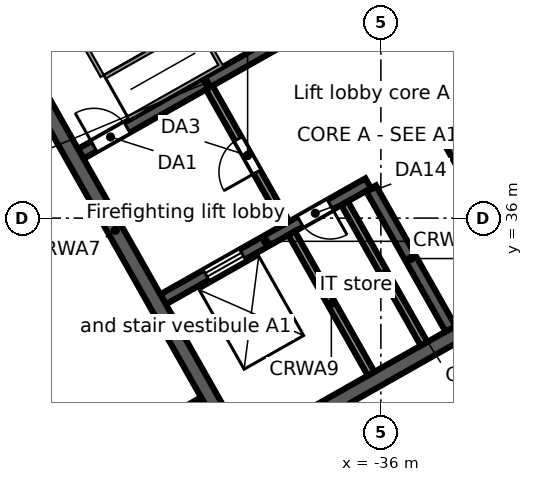
"""IFC4 building model, lengths in metres.
Left out: names, types, materials, properties, quantities, classifications, styles, units other than length and angle.
Written with IfcOpenShell. Run it as: python <this file> out.ifc"""

import sys

from ifc_helpers import new_model, si_unit, direction, frame, frame_2d, origin, place, context, subcontext, project, spatial, rectangle, extrude, element, fill, save


model = new_model("IFC4")
c1 = context("Model", 3, precision=1e-05, world=origin(), true_north=direction((0.0, 1.0)))
c2 = subcontext(c1, "Body", "Model", "MODEL_VIEW")
j1 = project(units=[si_unit("LENGTHUNIT", "METRE"), si_unit("PLANEANGLEUNIT", "RADIAN")], contexts=[c1])
p1 = place(None, origin())
s1 = spatial("IfcSite", under=j1, at=p1, CompositionType="ELEMENT")
p2 = place(p1, origin())
s2 = spatial("IfcBuilding", under=s1, at=p2, CompositionType="ELEMENT")
p3 = place(p2, frame((0.0, 0.0, 277.9)))
s3 = spatial("IfcBuildingStorey", under=s2, at=p3, CompositionType="ELEMENT", Elevation=277.9)
p4 = place(p3, frame((-58.732, 38.771, 0.0), z_axis=(0.0, 0.0, 1.0), x_axis=(0.870355615581, 0.492423702137, 0.0)))
e1 = element("IfcWall", 1, at=p4, inside=s3, PredefinedType="STANDARD", context=c2, shape_type="SweptSolid", body=[
    extrude(rectangle(XDim=64.052, YDim=0.25, at=frame_2d((32.026, 0.0))), origin(), (0.0, 0.0, 1.0), 3.52),
])
p5 = place(p4, frame((61.259, 0.0, 0.8)))
e2 = element("IfcOpeningElement", 2, at=p5, cuts=e1, PredefinedType="OPENING", context=c2, shape_type="SweptSolid", body=[
    extrude(rectangle(XDim=2.4, YDim=2.2, at=frame_2d((1.2, 1.1))), frame((0.0, 0.135, 0.0), z_axis=(0.0, -1.0, 0.0), x_axis=(1.0, 0.0, 0.0)), (0.0, 0.0, 1.0), 0.27),
])
p6 = place(p4, frame((58.216, 0.0, 0.8)))
e3 = element("IfcOpeningElement", 3, at=p6, cuts=e1, PredefinedType="OPENING", context=c2, shape_type="SweptSolid", body=[
    extrude(rectangle(XDim=2.4, YDim=2.2, at=frame_2d((1.2, 1.1))), frame((0.0, 0.135, 0.0), z_axis=(0.0, -1.0, 0.0), x_axis=(1.0, 0.0, 0.0)), (0.0, 0.0, 1.0), 0.27),
])
p7 = place(p4, frame((55.173, 0.0, 0.8)))
e4 = element("IfcOpeningElement", 4, at=p7, cuts=e1, PredefinedType="OPENING", context=c2, shape_type="SweptSolid", body=[
    extrude(rectangle(XDim=2.4, YDim=2.2, at=frame_2d((1.2, 1.1))), frame((0.0, 0.135, 0.0), z_axis=(0.0, -1.0, 0.0), x_axis=(1.0, 0.0, 0.0)), (0.0, 0.0, 1.0), 0.27),
])
p8 = place(p4, frame((52.129, 0.0, 0.8)))
e5 = element("IfcOpeningElement", 5, at=p8, cuts=e1, PredefinedType="OPENING", context=c2, shape_type="SweptSolid", body=[
    extrude(rectangle(XDim=2.4, YDim=2.2, at=frame_2d((1.2, 1.1))), frame((0.0, 0.135, 0.0), z_axis=(0.0, -1.0, 0.0), x_axis=(1.0, 0.0, 0.0)), (0.0, 0.0, 1.0), 0.27),
])
p9 = place(p4, frame((49.086, 0.0, 0.8)))
e6 = element("IfcOpeningElement", 6, at=p9, cuts=e1, PredefinedType="OPENING", context=c2, shape_type="SweptSolid", body=[
    extrude(rectangle(XDim=2.4, YDim=2.2, at=frame_2d((1.2, 1.1))), frame((0.0, 0.135, 0.0), z_axis=(0.0, -1.0, 0.0), x_axis=(1.0, 0.0, 0.0)), (0.0, 0.0, 1.0), 0.27),
])
p10 = place(p4, frame((46.043, 0.0, 0.8)))
e7 = element("IfcOpeningElement", 7, at=p10, cuts=e1, PredefinedType="OPENING", context=c2, shape_type="SweptSolid", body=[
    extrude(rectangle(XDim=2.4, YDim=2.2, at=frame_2d((1.2, 1.1))), frame((0.0, 0.135, 0.0), z_axis=(0.0, -1.0, 0.0), x_axis=(1.0, 0.0, 0.0)), (0.0, 0.0, 1.0), 0.27),
])
p11 = place(p4, frame((43.0, 0.0, 0.8)))
e8 = element("IfcOpeningElement", 8, at=p11, cuts=e1, PredefinedType="OPENING", context=c2, shape_type="SweptSolid", body=[
    extrude(rectangle(XDim=2.4, YDim=2.2, at=frame_2d((1.2, 1.1))), frame((0.0, 0.135, 0.0), z_axis=(0.0, -1.0, 0.0), x_axis=(1.0, 0.0, 0.0)), (0.0, 0.0, 1.0), 0.27),
])
p12 = place(p4, frame((39.956, 0.0, 0.8)))
e9 = element("IfcOpeningElement", 9, at=p12, cuts=e1, PredefinedType="OPENING", context=c2, shape_type="SweptSolid", body=[
    extrude(rectangle(XDim=2.4, YDim=2.2, at=frame_2d((1.2, 1.1))), frame((0.0, 0.135, 0.0), z_axis=(0.0, -1.0, 0.0), x_axis=(1.0, 0.0, 0.0)), (0.0, 0.0, 1.0), 0.27),
])
p13 = place(p4, frame((36.913, 0.0, 0.8)))
e10 = element("IfcOpeningElement", 10, at=p13, cuts=e1, PredefinedType="OPENING", context=c2, shape_type="SweptSolid", body=[
    extrude(rectangle(XDim=2.4, YDim=2.2, at=frame_2d((1.2, 1.1))), frame((0.0, 0.135, 0.0), z_axis=(0.0, -1.0, 0.0), x_axis=(1.0, 0.0, 0.0)), (0.0, 0.0, 1.0), 0.27),
])
p14 = place(p4, frame((33.87, 0.0, 0.8)))
e11 = element("IfcOpeningElement", 11, at=p14, cuts=e1, PredefinedType="OPENING", context=c2, shape_type="SweptSolid", body=[
    extrude(rectangle(XDim=2.4, YDim=2.2, at=frame_2d((1.2, 1.1))), frame((0.0, 0.135, 0.0), z_axis=(0.0, -1.0, 0.0), x_axis=(1.0, 0.0, 0.0)), (0.0, 0.0, 1.0), 0.27),
])
p15 = place(p4, frame((30.826, 0.0, 0.8)))
e12 = element("IfcOpeningElement", 12, at=p15, cuts=e1, PredefinedType="OPENING", context=c2, shape_type="SweptSolid", body=[
    extrude(rectangle(XDim=2.4, YDim=2.2, at=frame_2d((1.2, 1.1))), frame((0.0, 0.135, 0.0), z_axis=(0.0, -1.0, 0.0), x_axis=(1.0, 0.0, 0.0)), (0.0, 0.0, 1.0), 0.27),
])
p16 = place(p4, frame((27.783, 0.0, 0.8)))
e13 = element("IfcOpeningElement", 13, at=p16, cuts=e1, PredefinedType="OPENING", context=c2, shape_type="SweptSolid", body=[
    extrude(rectangle(XDim=2.4, YDim=2.2, at=frame_2d((1.2, 1.1))), frame((0.0, 0.135, 0.0), z_axis=(0.0, -1.0, 0.0), x_axis=(1.0, 0.0, 0.0)), (0.0, 0.0, 1.0), 0.27),
])
p17 = place(p4, frame((24.74, 0.0, 0.8)))
e14 = element("IfcOpeningElement", 14, at=p17, cuts=e1, PredefinedType="OPENING", context=c2, shape_type="SweptSolid", body=[
    extrude(rectangle(XDim=2.4, YDim=2.2, at=frame_2d((1.2, 1.1))), frame((0.0, 0.135, 0.0), z_axis=(0.0, -1.0, 0.0), x_axis=(1.0, 0.0, 0.0)), (0.0, 0.0, 1.0), 0.27),
])
p18 = place(p4, frame((21.696, 0.0, 0.8)))
e15 = element("IfcOpeningElement", 15, at=p18, cuts=e1, PredefinedType="OPENING", context=c2, shape_type="SweptSolid", body=[
    extrude(rectangle(XDim=2.4, YDim=2.2, at=frame_2d((1.2, 1.1))), frame((0.0, 0.135, 0.0), z_axis=(0.0, -1.0, 0.0), x_axis=(1.0, 0.0, 0.0)), (0.0, 0.0, 1.0), 0.27),
])
p19 = place(p4, frame((18.653, 0.0, 0.8)))
e16 = element("IfcOpeningElement", 16, at=p19, cuts=e1, PredefinedType="OPENING", context=c2, shape_type="SweptSolid", body=[
    extrude(rectangle(XDim=2.4, YDim=2.2, at=frame_2d((1.2, 1.1))), frame((0.0, 0.135, 0.0), z_axis=(0.0, -1.0, 0.0), x_axis=(1.0, 0.0, 0.0)), (0.0, 0.0, 1.0), 0.27),
])
p20 = place(p4, frame((15.61, 0.0, 0.8)))
e17 = element("IfcOpeningElement", 17, at=p20, cuts=e1, PredefinedType="OPENING", context=c2, shape_type="SweptSolid", body=[
    extrude(rectangle(XDim=2.4, YDim=2.2, at=frame_2d((1.2, 1.1))), frame((0.0, 0.135, 0.0), z_axis=(0.0, -1.0, 0.0), x_axis=(1.0, 0.0, 0.0)), (0.0, 0.0, 1.0), 0.27),
])
p21 = place(p4, frame((12.567, 0.0, 0.8)))
e18 = element("IfcOpeningElement", 18, at=p21, cuts=e1, PredefinedType="OPENING", context=c2, shape_type="SweptSolid", body=[
    extrude(rectangle(XDim=2.4, YDim=2.2, at=frame_2d((1.2, 1.1))), frame((0.0, 0.135, 0.0), z_axis=(0.0, -1.0, 0.0), x_axis=(1.0, 0.0, 0.0)), (0.0, 0.0, 1.0), 0.27),
])
p22 = place(p4, frame((9.523, 0.0, 0.8)))
e19 = element("IfcOpeningElement", 19, at=p22, cuts=e1, PredefinedType="OPENING", context=c2, shape_type="SweptSolid", body=[
    extrude(rectangle(XDim=2.4, YDim=2.2, at=frame_2d((1.2, 1.1))), frame((0.0, 0.135, 0.0), z_axis=(0.0, -1.0, 0.0), x_axis=(1.0, 0.0, 0.0)), (0.0, 0.0, 1.0), 0.27),
])
p23 = place(p4, frame((6.48, 0.0, 0.8)))
e20 = element("IfcOpeningElement", 20, at=p23, cuts=e1, PredefinedType="OPENING", context=c2, shape_type="SweptSolid", body=[
    extrude(rectangle(XDim=2.4, YDim=2.2, at=frame_2d((1.2, 1.1))), frame((0.0, 0.135, 0.0), z_axis=(0.0, -1.0, 0.0), x_axis=(1.0, 0.0, 0.0)), (0.0, 0.0, 1.0), 0.27),
])
p24 = place(p4, frame((3.437, 0.0, 0.8)))
e21 = element("IfcOpeningElement", 21, at=p24, cuts=e1, PredefinedType="OPENING", context=c2, shape_type="SweptSolid", body=[
    extrude(rectangle(XDim=2.4, YDim=2.2, at=frame_2d((1.2, 1.1))), frame((0.0, 0.135, 0.0), z_axis=(0.0, -1.0, 0.0), x_axis=(1.0, 0.0, 0.0)), (0.0, 0.0, 1.0), 0.27),
])
p25 = place(p4, frame((0.393, 0.0, 0.8)))
e22 = element("IfcOpeningElement", 22, at=p25, cuts=e1, PredefinedType="OPENING", context=c2, shape_type="SweptSolid", body=[
    extrude(rectangle(XDim=2.4, YDim=2.2, at=frame_2d((1.2, 1.1))), frame((0.0, 0.135, 0.0), z_axis=(0.0, -1.0, 0.0), x_axis=(1.0, 0.0, 0.0)), (0.0, 0.0, 1.0), 0.27),
])
p26 = place(p3, frame((-44.115, 26.507, 0.0), z_axis=(0.0, 0.0, 1.0), x_axis=(-0.857166583633, 0.515039268311, 0.0)))
e23 = element("IfcWall", 23, at=p26, inside=s3, PredefinedType="STANDARD", context=c2, shape_type="SweptSolid", body=[
    extrude(rectangle(XDim=17.106, YDim=0.25, at=frame_2d((8.553, 0.0))), origin(), (0.0, 0.0, 1.0), 3.52),
])
p27 = place(p26, frame((14.417, 0.0, 0.8)))
e24 = element("IfcOpeningElement", 24, at=p27, cuts=e23, PredefinedType="OPENING", context=c2, shape_type="SweptSolid", body=[
    extrude(rectangle(XDim=2.4, YDim=2.2, at=frame_2d((1.2, 1.1))), frame((0.0, 0.135, 0.0), z_axis=(0.0, -1.0, 0.0), x_axis=(1.0, 0.0, 0.0)), (0.0, 0.0, 1.0), 0.27),
])
p28 = place(p26, frame((11.584, 0.0, 0.8)))
e25 = element("IfcOpeningElement", 25, at=p28, cuts=e23, PredefinedType="OPENING", context=c2, shape_type="SweptSolid", body=[
    extrude(rectangle(XDim=2.4, YDim=2.2, at=frame_2d((1.2, 1.1))), frame((0.0, 0.135, 0.0), z_axis=(0.0, -1.0, 0.0), x_axis=(1.0, 0.0, 0.0)), (0.0, 0.0, 1.0), 0.27),
])
p29 = place(p26, frame((8.75, 0.0, 0.8)))
e26 = element("IfcOpeningElement", 26, at=p29, cuts=e23, PredefinedType="OPENING", context=c2, shape_type="SweptSolid", body=[
    extrude(rectangle(XDim=2.4, YDim=2.2, at=frame_2d((1.2, 1.1))), frame((0.0, 0.135, 0.0), z_axis=(0.0, -1.0, 0.0), x_axis=(1.0, 0.0, 0.0)), (0.0, 0.0, 1.0), 0.27),
])
p30 = place(p26, frame((5.917, 0.0, 0.8)))
e27 = element("IfcOpeningElement", 27, at=p30, cuts=e23, PredefinedType="OPENING", context=c2, shape_type="SweptSolid", body=[
    extrude(rectangle(XDim=2.4, YDim=2.2, at=frame_2d((1.2, 1.1))), frame((0.0, 0.135, 0.0), z_axis=(0.0, -1.0, 0.0), x_axis=(1.0, 0.0, 0.0)), (0.0, 0.0, 1.0), 0.27),
])
p31 = place(p26, frame((3.084, 0.0, 0.8)))
e28 = element("IfcOpeningElement", 28, at=p31, cuts=e23, PredefinedType="OPENING", context=c2, shape_type="SweptSolid", body=[
    extrude(rectangle(XDim=2.4, YDim=2.2, at=frame_2d((1.2, 1.1))), frame((0.0, 0.135, 0.0), z_axis=(0.0, -1.0, 0.0), x_axis=(1.0, 0.0, 0.0)), (0.0, 0.0, 1.0), 0.27),
])
p32 = place(p26, frame((0.25, 0.0, 0.8)))
e29 = element("IfcOpeningElement", 29, at=p32, cuts=e23, PredefinedType="OPENING", context=c2, shape_type="SweptSolid", body=[
    extrude(rectangle(XDim=2.4, YDim=2.2, at=frame_2d((1.2, 1.1))), frame((0.0, 0.135, 0.0), z_axis=(0.0, -1.0, 0.0), x_axis=(1.0, 0.0, 0.0)), (0.0, 0.0, 1.0), 0.27),
])
p33 = place(p3, frame((-3.017, 46.293, 0.0), z_axis=(0.0, 0.0, 1.0), x_axis=(-0.870355474887, -0.492423950812, 0.0)))
e30 = element("IfcWall", 30, at=p33, inside=s3, PredefinedType="STANDARD", context=c2, shape_type="SweptSolid", body=[
    extrude(rectangle(XDim=40.34, YDim=0.25, at=frame_2d((20.17, 0.0))), origin(), (0.0, 0.0, 1.0), 3.52),
])
p34 = place(p33, frame((37.428, 0.0, 0.8)))
e31 = element("IfcOpeningElement", 31, at=p34, cuts=e30, PredefinedType="OPENING", context=c2, shape_type="SweptSolid", body=[
    extrude(rectangle(XDim=2.4, YDim=2.2, at=frame_2d((1.2, 1.1))), frame((0.0, 0.135, 0.0), z_axis=(0.0, -1.0, 0.0), x_axis=(1.0, 0.0, 0.0)), (0.0, 0.0, 1.0), 0.27),
])
p35 = place(p33, frame((34.372, 0.0, 0.0)))
e32 = element("IfcOpeningElement", 32, at=p35, cuts=e30, PredefinedType="OPENING", context=c2, shape_type="SweptSolid", body=[
    extrude(rectangle(XDim=1.8, YDim=2.4, at=frame_2d((0.9, 1.2))), frame((0.0, 0.135, 0.0), z_axis=(0.0, -1.0, 0.0), x_axis=(1.0, 0.0, 0.0)), (0.0, 0.0, 1.0), 0.27),
])
p36 = place(p33, frame((30.716, 0.0, 0.8)))
e33 = element("IfcOpeningElement", 33, at=p36, cuts=e30, PredefinedType="OPENING", context=c2, shape_type="SweptSolid", body=[
    extrude(rectangle(XDim=2.4, YDim=2.2, at=frame_2d((1.2, 1.1))), frame((0.0, 0.135, 0.0), z_axis=(0.0, -1.0, 0.0), x_axis=(1.0, 0.0, 0.0)), (0.0, 0.0, 1.0), 0.27),
])
p37 = place(p33, frame((27.36, 0.0, 0.8)))
e34 = element("IfcOpeningElement", 34, at=p37, cuts=e30, PredefinedType="OPENING", context=c2, shape_type="SweptSolid", body=[
    extrude(rectangle(XDim=2.4, YDim=2.2, at=frame_2d((1.2, 1.1))), frame((0.0, 0.135, 0.0), z_axis=(0.0, -1.0, 0.0), x_axis=(1.0, 0.0, 0.0)), (0.0, 0.0, 1.0), 0.27),
])
p38 = place(p33, frame((24.304, 0.0, 0.0)))
e35 = element("IfcOpeningElement", 35, at=p38, cuts=e30, PredefinedType="OPENING", context=c2, shape_type="SweptSolid", body=[
    extrude(rectangle(XDim=1.8, YDim=2.4, at=frame_2d((0.9, 1.2))), frame((0.0, 0.135, 0.0), z_axis=(0.0, -1.0, 0.0), x_axis=(1.0, 0.0, 0.0)), (0.0, 0.0, 1.0), 0.27),
])
p39 = place(p33, frame((20.648, 0.0, 0.8)))
e36 = element("IfcOpeningElement", 36, at=p39, cuts=e30, PredefinedType="OPENING", context=c2, shape_type="SweptSolid", body=[
    extrude(rectangle(XDim=2.4, YDim=2.2, at=frame_2d((1.2, 1.1))), frame((0.0, 0.135, 0.0), z_axis=(0.0, -1.0, 0.0), x_axis=(1.0, 0.0, 0.0)), (0.0, 0.0, 1.0), 0.27),
])
p40 = place(p33, frame((17.292, 0.0, 0.8)))
e37 = element("IfcOpeningElement", 37, at=p40, cuts=e30, PredefinedType="OPENING", context=c2, shape_type="SweptSolid", body=[
    extrude(rectangle(XDim=2.4, YDim=2.2, at=frame_2d((1.2, 1.1))), frame((0.0, 0.135, 0.0), z_axis=(0.0, -1.0, 0.0), x_axis=(1.0, 0.0, 0.0)), (0.0, 0.0, 1.0), 0.27),
])
p41 = place(p33, frame((14.236, 0.0, 0.0)))
e38 = element("IfcOpeningElement", 38, at=p41, cuts=e30, PredefinedType="OPENING", context=c2, shape_type="SweptSolid", body=[
    extrude(rectangle(XDim=1.8, YDim=2.4, at=frame_2d((0.9, 1.2))), frame((0.0, 0.135, 0.0), z_axis=(0.0, -1.0, 0.0), x_axis=(1.0, 0.0, 0.0)), (0.0, 0.0, 1.0), 0.27),
])
p42 = place(p33, frame((10.58, 0.0, 0.8)))
e39 = element("IfcOpeningElement", 39, at=p42, cuts=e30, PredefinedType="OPENING", context=c2, shape_type="SweptSolid", body=[
    extrude(rectangle(XDim=2.4, YDim=2.2, at=frame_2d((1.2, 1.1))), frame((0.0, 0.135, 0.0), z_axis=(0.0, -1.0, 0.0), x_axis=(1.0, 0.0, 0.0)), (0.0, 0.0, 1.0), 0.27),
])
p43 = place(p33, frame((7.224, 0.0, 0.8)))
e40 = element("IfcOpeningElement", 40, at=p43, cuts=e30, PredefinedType="OPENING", context=c2, shape_type="SweptSolid", body=[
    extrude(rectangle(XDim=2.4, YDim=2.2, at=frame_2d((1.2, 1.1))), frame((0.0, 0.135, 0.0), z_axis=(0.0, -1.0, 0.0), x_axis=(1.0, 0.0, 0.0)), (0.0, 0.0, 1.0), 0.27),
])
p44 = place(p33, frame((4.168, 0.0, 0.0)))
e41 = element("IfcOpeningElement", 41, at=p44, cuts=e30, PredefinedType="OPENING", context=c2, shape_type="SweptSolid", body=[
    extrude(rectangle(XDim=1.8, YDim=2.4, at=frame_2d((0.9, 1.2))), frame((0.0, 0.135, 0.0), z_axis=(0.0, -1.0, 0.0), x_axis=(1.0, 0.0, 0.0)), (0.0, 0.0, 1.0), 0.27),
])
p45 = place(p33, frame((0.512, 0.0, 0.8)))
e42 = element("IfcOpeningElement", 42, at=p45, cuts=e30, PredefinedType="OPENING", context=c2, shape_type="SweptSolid", body=[
    extrude(rectangle(XDim=2.4, YDim=2.2, at=frame_2d((1.2, 1.1))), frame((0.0, 0.135, 0.0), z_axis=(0.0, -1.0, 0.0), x_axis=(1.0, 0.0, 0.0)), (0.0, 0.0, 1.0), 0.27),
])
p46 = place(p3, frame((-39.813, 29.662, 0.0), z_axis=(0.0, 0.0, 1.0), x_axis=(0.870350116061, 0.492433422375, 0.0)))
e43 = element("IfcWall", 43, at=p46, inside=s3, PredefinedType="SOLIDWALL", context=c2, shape_type="SweptSolid", body=[
    extrude(rectangle(XDim=17.0, YDim=0.4, at=frame_2d((8.5, 0.0))), origin(), (0.0, 0.0, 1.0), 3.52),
])
p47 = place(p46, frame((7.2, 0.0, 0.0)))
e44 = element("IfcOpeningElement", 44, at=p47, cuts=e43, PredefinedType="OPENING", context=c2, shape_type="SweptSolid", body=[
    extrude(rectangle(XDim=1.2, YDim=2.1, at=frame_2d((0.6, 1.05))), frame((0.0, 0.21, 0.0), z_axis=(0.0, -1.0, 0.0), x_axis=(1.0, 0.0, 0.0)), (0.0, 0.0, 1.0), 0.42),
])
p48 = place(p3, frame((-41.73, 33.863, 0.0), z_axis=(0.0, 0.0, 1.0), x_axis=(0.870350800578, 0.492432212525, 0.0)))
e45 = element("IfcWall", 45, at=p48, inside=s3, PredefinedType="SOLIDWALL", context=c2, shape_type="SweptSolid", body=[
    extrude(rectangle(XDim=6.2, YDim=0.3, at=frame_2d((3.1, 0.0))), origin(), (0.0, 0.0, 1.0), 3.52),
])
p49 = place(p48, frame((1.3, 0.0, 0.0)))
e46 = element("IfcOpeningElement", 46, at=p49, cuts=e45, PredefinedType="OPENING", context=c2, shape_type="SweptSolid", body=[
    extrude(rectangle(XDim=1.1, YDim=2.1, at=frame_2d((0.55, 1.05))), frame((0.0, 0.16, 0.0), z_axis=(0.0, -1.0, 0.0), x_axis=(1.0, 0.0, 0.0)), (0.0, 0.0, 1.0), 0.32),
])
p50 = place(p48, frame((4.15, 0.0, 0.0)))
e47 = element("IfcOpeningElement", 47, at=p50, cuts=e45, PredefinedType="OPENING", context=c2, shape_type="SweptSolid", body=[
    extrude(rectangle(XDim=0.9, YDim=2.1, at=frame_2d((0.45, 1.05))), frame((0.0, 0.16, 0.0), z_axis=(0.0, -1.0, 0.0), x_axis=(1.0, 0.0, 0.0)), (0.0, 0.0, 1.0), 0.32),
])
p51 = place(p3, frame((-34.245, 38.097, 0.0), z_axis=(0.0, 0.0, 1.0), x_axis=(0.870356351998, 0.492422400523, 0.0)))
e48 = element("IfcWall", 48, at=p51, inside=s3, PredefinedType="SOLIDWALL", context=c2, shape_type="SweptSolid", body=[
    extrude(rectangle(XDim=7.6, YDim=0.3, at=frame_2d((3.8, 0.0))), origin(), (0.0, 0.0, 1.0), 3.52),
])
p52 = place(p51, frame((6.2, 0.0, 0.0)))
e49 = element("IfcOpeningElement", 49, at=p52, cuts=e48, PredefinedType="OPENING", context=c2, shape_type="SweptSolid", body=[
    extrude(rectangle(XDim=1.0, YDim=2.1, at=frame_2d((0.5, 1.05))), frame((0.0, 0.16, 0.0), z_axis=(0.0, -1.0, 0.0), x_axis=(1.0, 0.0, 0.0)), (0.0, 0.0, 1.0), 0.32),
])
p53 = place(p3, frame((-43.897, 37.692, 0.0), z_axis=(0.0, 0.0, 1.0), x_axis=(0.870356351998, 0.492422400523, 0.0)))
e50 = element("IfcWall", 50, at=p53, inside=s3, PredefinedType="SOLIDWALL", context=c2, shape_type="SweptSolid", body=[
    extrude(rectangle(XDim=7.6, YDim=0.3, at=frame_2d((3.8, 0.0))), origin(), (0.0, 0.0, 1.0), 3.52),
])
p54 = place(p53, frame((0.4, 0.0, 0.0)))
e51 = element("IfcOpeningElement", 51, at=p54, cuts=e50, PredefinedType="OPENING", context=c2, shape_type="SweptSolid", body=[
    extrude(rectangle(XDim=1.0, YDim=2.1, at=frame_2d((0.5, 1.05))), frame((0.0, 0.16, 0.0), z_axis=(0.0, -1.0, 0.0), x_axis=(1.0, 0.0, 0.0)), (0.0, 0.0, 1.0), 0.32),
])
p55 = place(p3, frame((-46.238, 41.423, 0.0), z_axis=(0.0, 0.0, 1.0), x_axis=(0.492421663121, -0.870356769198, 0.0)))
e52 = element("IfcWall", 52, at=p55, inside=s3, PredefinedType="SOLIDWALL", context=c2, shape_type="SweptSolid", body=[
    extrude(rectangle(XDim=13.2, YDim=0.4, at=frame_2d((6.6, 0.0))), origin(), (0.0, 0.0, 1.0), 3.52),
])
p56 = place(p3, frame((-38.349, 35.603, 0.0), z_axis=(0.0, 0.0, 1.0), x_axis=(0.492397924348, -0.870370199454, 0.0)))
e53 = element("IfcWall", 53, at=p56, inside=s3, PredefinedType="SOLIDWALL", context=c2, shape_type="SweptSolid", body=[
    extrude(rectangle(XDim=4.25, YDim=0.2, at=frame_2d((2.125, 0.0))), origin(), (0.0, 0.0, 1.0), 3.52),
])
p57 = place(p3, frame((-40.516, 39.433, 0.0), z_axis=(0.0, 0.0, 1.0), x_axis=(0.492453559952, -0.87033872216, 0.0)))
e54 = element("IfcWall", 54, at=p57, inside=s3, PredefinedType="PARTITIONING", context=c2, shape_type="SweptSolid", body=[
    extrude(rectangle(XDim=4.1, YDim=0.2, at=frame_2d((2.05, 0.0))), origin(), (0.0, 0.0, 1.0), 3.52),
])
p58 = place(p57, frame((1.55, 0.0, 0.0)))
e55 = element("IfcOpeningElement", 55, at=p58, cuts=e54, PredefinedType="OPENING", context=c2, shape_type="SweptSolid", body=[
    extrude(rectangle(XDim=1.0, YDim=2.1, at=frame_2d((0.5, 1.05))), frame((0.0, 0.11, 0.0), z_axis=(0.0, -1.0, 0.0), x_axis=(1.0, 0.0, 0.0)), (0.0, 0.0, 1.0), 0.22),
])
p59 = place(p3, frame((-36.956, 36.391, 0.0), z_axis=(0.0, 0.0, 1.0), x_axis=(0.492397924348, -0.870370199454, 0.0)))
e56 = element("IfcWall", 56, at=p59, inside=s3, PredefinedType="SOLIDWALL", context=c2, shape_type="SweptSolid", body=[
    extrude(rectangle(XDim=4.25, YDim=0.2, at=frame_2d((2.125, 0.0))), origin(), (0.0, 0.0, 1.0), 3.52),
])
for number, where, z_axis, x_axis in (
    (57, (-36.26, 36.785, 0.0), (0.0, 0.0, 1.0), (0.492, -0.87, 0.0)),
    (58, (-34.171, 37.967, 0.0), (0.0, 0.0, 1.0), (0.492, -0.87, 0.0)),
):
    element("IfcWall", number, at=place(p3, frame(where, z_axis=z_axis, x_axis=x_axis)), inside=s3, PredefinedType="SOLIDWALL", context=c2, shape_type="SweptSolid", body=[
        extrude(rectangle(XDim=4.25, YDim=0.3, at=frame_2d((2.125, 0.0))), origin(), (0.0, 0.0, 1.0), 3.52),
    ])
p60 = place(p3, frame((-46.381, 28.015, 0.0), z_axis=(0.0, 0.0, 1.0), x_axis=(0.870364232693, 0.492408471139, 0.0)))
e59 = element("IfcWall", 59, at=p60, inside=s3, PredefinedType="PARTITIONING", context=c2, shape_type="SweptSolid", body=[
    extrude(rectangle(XDim=6.527, YDim=0.125, at=frame_2d((3.264, 0.0))), origin(), (0.0, 0.0, 1.0), 2.8),
])
p61 = place(p60, frame((2.7, 0.0, 0.0)))
e60 = element("IfcOpeningElement", 60, at=p61, cuts=e59, PredefinedType="OPENING", context=c2, shape_type="SweptSolid", body=[
    extrude(rectangle(XDim=0.9, YDim=2.1, at=frame_2d((0.45, 1.05))), frame((0.0, 0.073, 0.0), z_axis=(0.0, -1.0, 0.0), x_axis=(1.0, 0.0, 0.0)), (0.0, 0.0, 1.0), 0.145),
])
p62 = place(p49, origin())
e61 = element("IfcDoor", 61, at=p62, inside=s3, OperationType="DOUBLE_DOOR_SLIDING", PredefinedType="DOOR", context=c2, shape_type="SweptSolid", body=[
    extrude(rectangle(XDim=1.1, YDim=2.1, at=frame_2d((0.55, 1.05))), frame((0.0, 0.025, 0.0), z_axis=(0.0, -1.0, 0.0), x_axis=(1.0, 0.0, 0.0)), (0.0, 0.0, 1.0), 0.05),
])
fill(e46, e61)
p63 = place(p54, origin())
e62 = element("IfcDoor", 62, at=p63, inside=s3, OperationType="SINGLE_SWING_LEFT", PredefinedType="DOOR", context=c2, shape_type="SweptSolid", body=[
    extrude(rectangle(XDim=1.0, YDim=2.1, at=frame_2d((0.5, 1.05))), frame((0.0, 0.025, 0.0), z_axis=(0.0, -1.0, 0.0), x_axis=(1.0, 0.0, 0.0)), (0.0, 0.0, 1.0), 0.05),
])
fill(e51, e62)
p64 = place(p58, frame((1.0, 0.0, 0.0), z_axis=(0.0, 0.0, 1.0), x_axis=(-1.0, 0.0, 0.0)))
e63 = element("IfcDoor", 63, at=p64, inside=s3, OperationType="SINGLE_SWING_LEFT", PredefinedType="DOOR", context=c2, shape_type="SweptSolid", body=[
    extrude(rectangle(XDim=1.0, YDim=2.1, at=frame_2d((0.5, 1.05))), frame((0.0, 0.025, 0.0), z_axis=(0.0, -1.0, 0.0), x_axis=(1.0, 0.0, 0.0)), (0.0, 0.0, 1.0), 0.05),
])
fill(e55, e63)
p65 = place(p50, frame((0.9, 0.0, 0.0), z_axis=(0.0, 0.0, 1.0), x_axis=(-1.0, 0.0, 0.0)))
e64 = element("IfcDoor", 64, at=p65, inside=s3, OperationType="SINGLE_SWING_LEFT", PredefinedType="DOOR", context=c2, shape_type="SweptSolid", body=[
    extrude(rectangle(XDim=0.9, YDim=2.1, at=frame_2d((0.45, 1.05))), frame((0.0, 0.025, 0.0), z_axis=(0.0, -1.0, 0.0), x_axis=(1.0, 0.0, 0.0)), (0.0, 0.0, 1.0), 0.05),
])
fill(e47, e64)
save(model, sys.argv[1])
